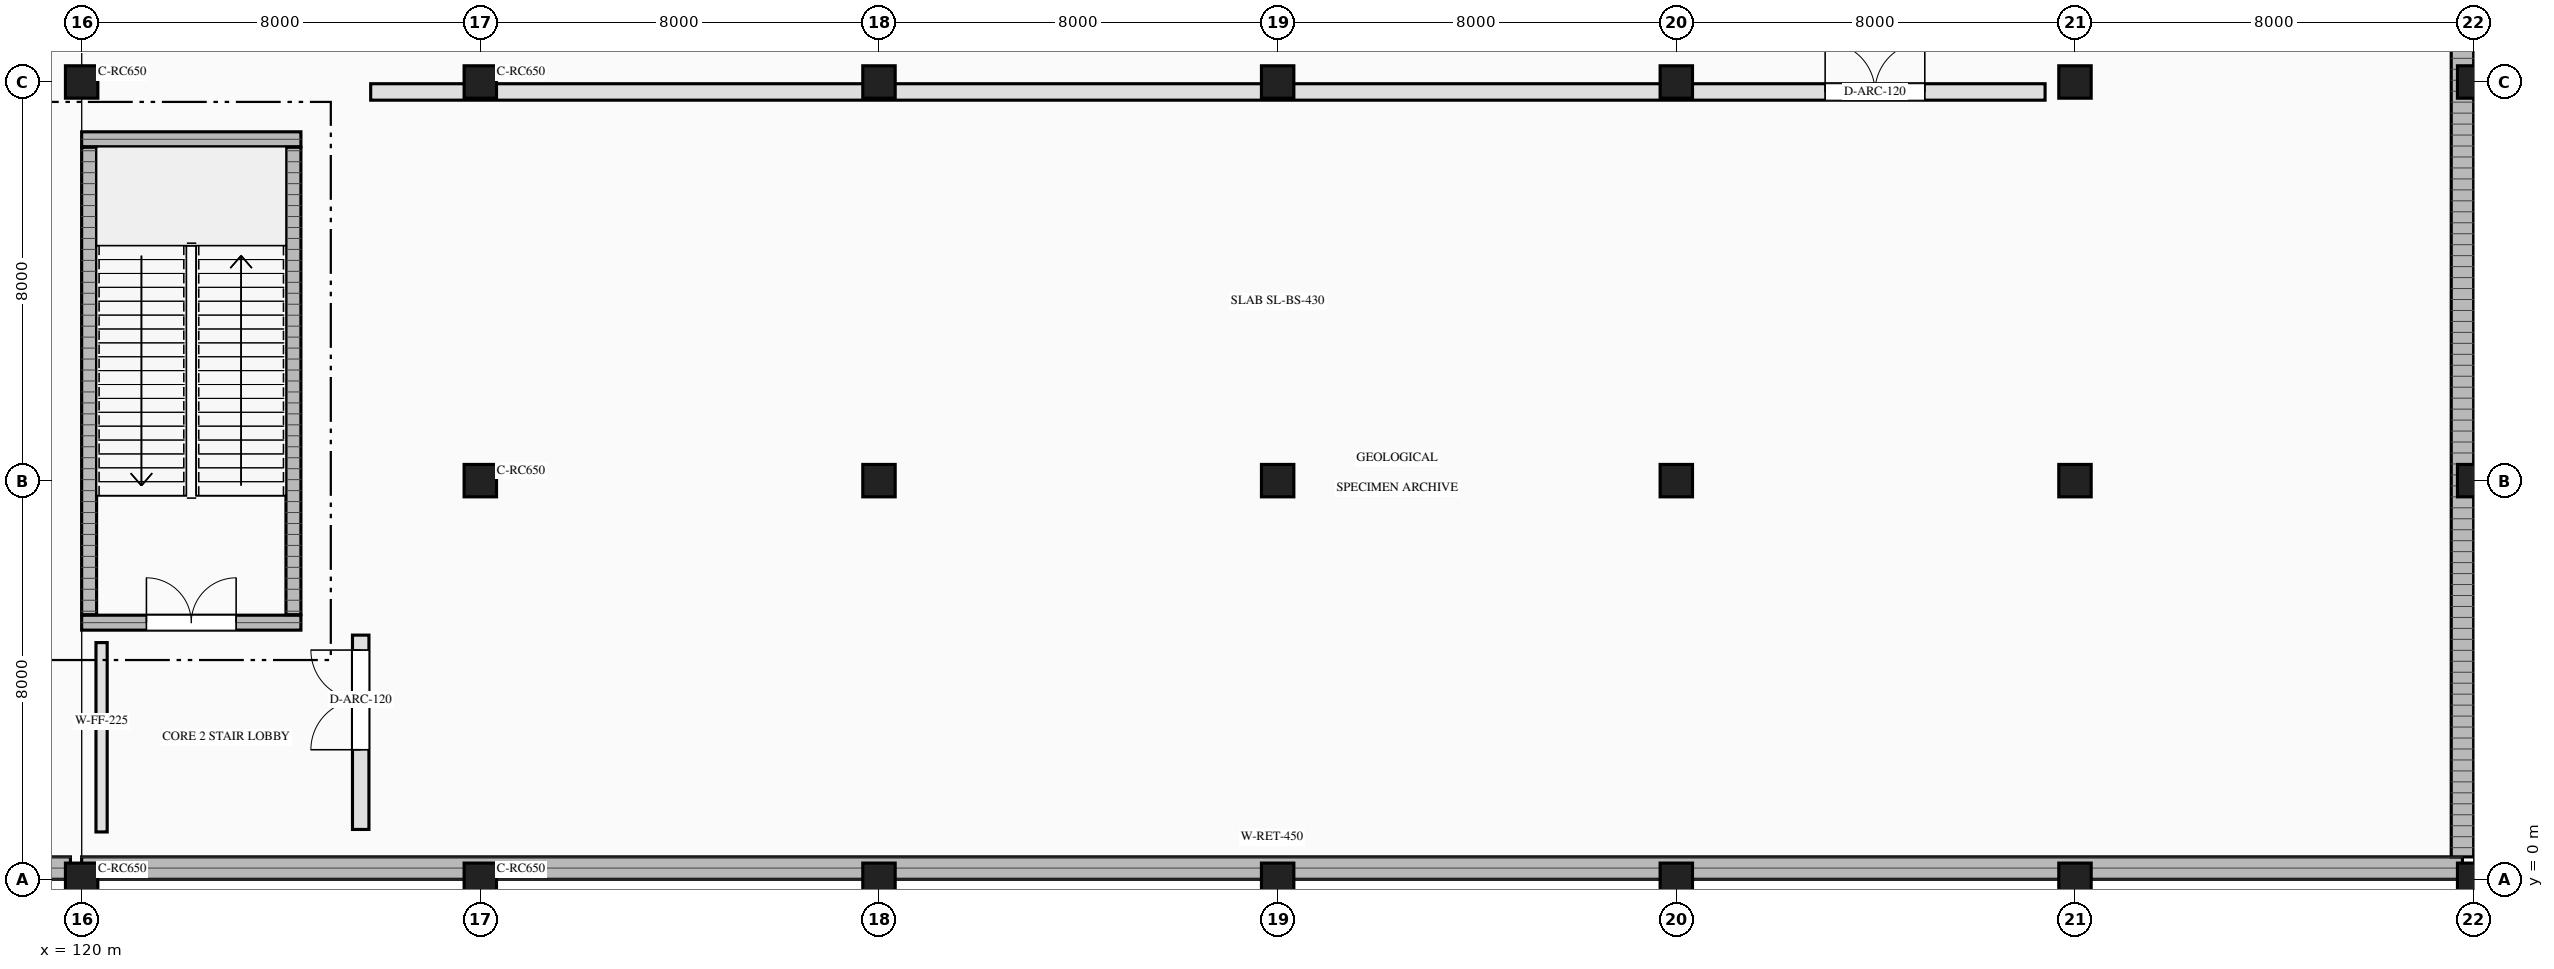
"""IFC4 building model, lengths in metres.
Left out: names, types, materials, properties, quantities, classifications, styles, units other than length and angle.
Written with IfcOpenShell. Run it as: python <this file> out.ifc"""

import sys

from ifc_helpers import new_model, si_unit, direction, frame, frame_2d, origin, origin_2d, place, context, subcontext, project, spatial, rectangle, extrude, element, fill, save


model = new_model("IFC4")
c1 = context("Model", 3, precision=1e-05, world=origin(), true_north=direction((0.0, 1.0)))
c2 = subcontext(c1, "Body", "Model", "MODEL_VIEW")
j1 = project(units=[si_unit("LENGTHUNIT", "METRE"), si_unit("PLANEANGLEUNIT", "RADIAN")], contexts=[c1])
p1 = place(None, origin())
s1 = spatial("IfcSite", under=j1, at=p1, CompositionType="ELEMENT")
p2 = place(p1, origin())
s2 = spatial("IfcBuilding", under=s1, at=p2, CompositionType="ELEMENT")
p3 = place(p2, frame((0.0, 0.0, -5.4)))
s3 = spatial("IfcBuildingStorey", under=s2, at=p3, CompositionType="ELEMENT", Elevation=-5.4)
p4 = place(p3, frame((120.0, 0.225, -0.4), z_axis=(0.0, 0.0, 1.0), x_axis=(1.0, 0.0, 0.0)))
e1 = element("IfcWall", 1, at=p4, inside=s3, PredefinedType="USERDEFINED", context=c2, shape_type="SweptSolid", body=[
    extrude(rectangle(XDim=47.775, YDim=0.45, at=frame_2d((23.887, 0.0))), origin(), (0.0, 0.0, 1.0), 5.5),
])
p5 = place(p3, frame((167.775, 0.45, -0.4), z_axis=(0.0, 0.0, 1.0), x_axis=(0.0, 1.0, 0.0)))
e2 = element("IfcWall", 2, at=p5, inside=s3, PredefinedType="USERDEFINED", context=c2, shape_type="SweptSolid", body=[
    extrude(rectangle(XDim=32.49, YDim=0.45, at=frame_2d((16.245, 0.0))), origin(), (0.0, 0.0, 1.0), 5.5),
])
p6 = place(p3, frame((80.225, 0.225, -0.4), z_axis=(0.0, 0.0, 1.0), x_axis=(1.0, 0.0, 0.0)))
e3 = element("IfcWall", 3, at=p6, inside=s3, PredefinedType="USERDEFINED", context=c2, shape_type="SweptSolid", body=[
    extrude(rectangle(XDim=39.55, YDim=0.45, at=frame_2d((19.775, 0.0))), origin(), (0.0, 0.0, 1.0), 5.5),
])
p7 = place(p3, frame((120.0, 5.15, -0.4), z_axis=(0.0, 0.0, 1.0), x_axis=(1.0, 0.0, 0.0)))
e4 = element("IfcWall", 4, at=p7, inside=s3, PredefinedType="SHEAR", context=c2, shape_type="SweptSolid", body=[
    extrude(rectangle(XDim=4.4, YDim=0.3, at=frame_2d((2.2, 0.0))), origin(), (0.0, 0.0, 1.0), 5.8),
])
p8 = place(p7, frame((1.3, 0.0, 0.4)))
e5 = element("IfcOpeningElement", 5, at=p8, cuts=e4, PredefinedType="OPENING", context=c2, shape_type="SweptSolid", body=[
    extrude(rectangle(XDim=1.8, YDim=2.2, at=frame_2d((0.9, 1.1))), frame((0.0, 0.16, 0.0), z_axis=(0.0, -1.0, 0.0), x_axis=(1.0, 0.0, 0.0)), (0.0, 0.0, 1.0), 0.32),
])
p9 = place(p3, frame((120.0, 14.85, -0.4), z_axis=(0.0, 0.0, 1.0), x_axis=(1.0, 0.0, 0.0)))
e6 = element("IfcWall", 6, at=p9, inside=s3, PredefinedType="SHEAR", context=c2, shape_type="SweptSolid", body=[
    extrude(rectangle(XDim=4.4, YDim=0.3, at=frame_2d((2.2, 0.0))), origin(), (0.0, 0.0, 1.0), 5.8),
])
for number, where, z_axis, x_axis in (
    (7, (120.15, 5.31, -0.4), (0.0, 0.0, 1.0), (0.0, 1.0, 0.0)),
    (8, (124.25, 5.31, -0.4), (0.0, 0.0, 1.0), (0.0, 1.0, 0.0)),
):
    element("IfcWall", number, at=place(p3, frame(where, z_axis=z_axis, x_axis=x_axis)), inside=s3, PredefinedType="SHEAR", context=c2, shape_type="SweptSolid", body=[
        extrude(rectangle(XDim=9.38, YDim=0.3, at=frame_2d((4.69, 0.0))), origin(), (0.0, 0.0, 1.0), 5.8),
    ])
for number, where, z_axis, x_axis in (
    (9, (120.0, 0.0, -0.4), (0.0, 0.0, 1.0), (1.0, 0.0, 0.0)),
    (10, (120.0, 16.0, -0.4), (0.0, 0.0, 1.0), (1.0, 0.0, 0.0)),
    (11, (128.0, 0.0, -0.4), (0.0, 0.0, 1.0), (1.0, 0.0, 0.0)),
    (12, (128.0, 8.0, -0.4), (0.0, 0.0, 1.0), (1.0, 0.0, 0.0)),
    (13, (128.0, 16.0, -0.4), (0.0, 0.0, 1.0), (1.0, 0.0, 0.0)),
    (14, (136.0, 0.0, -0.4), (0.0, 0.0, 1.0), (1.0, 0.0, 0.0)),
    (15, (136.0, 8.0, -0.4), (0.0, 0.0, 1.0), (1.0, 0.0, 0.0)),
    (16, (136.0, 16.0, -0.4), (0.0, 0.0, 1.0), (1.0, 0.0, 0.0)),
    (17, (144.0, 0.0, -0.4), (0.0, 0.0, 1.0), (1.0, 0.0, 0.0)),
    (18, (144.0, 8.0, -0.4), (0.0, 0.0, 1.0), (1.0, 0.0, 0.0)),
    (19, (144.0, 16.0, -0.4), (0.0, 0.0, 1.0), (1.0, 0.0, 0.0)),
    (20, (152.0, 0.0, -0.4), (0.0, 0.0, 1.0), (1.0, 0.0, 0.0)),
    (21, (152.0, 8.0, -0.4), (0.0, 0.0, 1.0), (1.0, 0.0, 0.0)),
    (22, (152.0, 16.0, -0.4), (0.0, 0.0, 1.0), (1.0, 0.0, 0.0)),
    (23, (160.0, 0.0, -0.4), (0.0, 0.0, 1.0), (1.0, 0.0, 0.0)),
    (24, (160.0, 8.0, -0.4), (0.0, 0.0, 1.0), (1.0, 0.0, 0.0)),
    (25, (160.0, 16.0, -0.4), (0.0, 0.0, 1.0), (1.0, 0.0, 0.0)),
    (26, (168.0, 0.0, -0.4), (0.0, 0.0, 1.0), (1.0, 0.0, 0.0)),
    (27, (168.0, 8.0, -0.4), (0.0, 0.0, 1.0), (1.0, 0.0, 0.0)),
    (28, (168.0, 16.0, -0.4), (0.0, 0.0, 1.0), (1.0, 0.0, 0.0)),
):
    element("IfcColumn", number, at=place(p3, frame(where, z_axis=z_axis, x_axis=x_axis)), inside=s3, PredefinedType="COLUMN", context=c2, shape_type="SweptSolid", body=[
        extrude(rectangle(XDim=0.65, YDim=0.65, at=origin_2d()), origin(), (0.0, 0.0, 1.0), 5.8),
    ])
p10 = place(p3, frame((125.6, 1.0, 0.0), z_axis=(0.0, 0.0, 1.0), x_axis=(0.0, 1.0, 0.0)))
e29 = element("IfcWall", 29, at=p10, inside=s3, PredefinedType="SOLIDWALL", context=c2, shape_type="SweptSolid", body=[
    extrude(rectangle(XDim=3.9, YDim=0.33, at=frame_2d((1.95, 0.0))), origin(), (0.0, 0.0, 1.0), 5.12),
])
p11 = place(p10, frame((1.6, 0.0, 0.0)))
e30 = element("IfcOpeningElement", 30, at=p11, cuts=e29, PredefinedType="OPENING", context=c2, shape_type="SweptSolid", body=[
    extrude(rectangle(XDim=2.0, YDim=2.5, at=frame_2d((1.0, 1.25))), frame((0.0, 0.175, 0.0), z_axis=(0.0, -1.0, 0.0), x_axis=(1.0, 0.0, 0.0)), (0.0, 0.0, 1.0), 0.35),
])
p12 = place(p3, frame((125.8, 15.8, 0.0), z_axis=(0.0, 0.0, 1.0), x_axis=(1.0, 0.0, 0.0)))
e31 = element("IfcWall", 31, at=p12, inside=s3, PredefinedType="SOLIDWALL", context=c2, shape_type="SweptSolid", body=[
    extrude(rectangle(XDim=33.6, YDim=0.33, at=frame_2d((16.8, 0.0))), origin(), (0.0, 0.0, 1.0), 4.72),
])
p13 = place(p12, frame((29.186, 0.0, 0.0)))
e32 = element("IfcOpeningElement", 32, at=p13, cuts=e31, PredefinedType="OPENING", context=c2, shape_type="SweptSolid", body=[
    extrude(rectangle(XDim=2.0, YDim=2.5, at=frame_2d((1.0, 1.25))), frame((0.0, 0.175, 0.0), z_axis=(0.0, -1.0, 0.0), x_axis=(1.0, 0.0, 0.0)), (0.0, 0.0, 1.0), 0.35),
])
p14 = place(p3, frame((120.4, 0.95, 0.0), z_axis=(0.0, 0.0, 1.0), x_axis=(0.0, 1.0, 0.0)))
e33 = element("IfcWall", 33, at=p14, inside=s3, PredefinedType="SOLIDWALL", context=c2, shape_type="SweptSolid", body=[
    extrude(rectangle(XDim=3.8, YDim=0.225, at=frame_2d((1.9, 0.0))), origin(), (0.0, 0.0, 1.0), 5.12),
])
p15 = place(p8, origin())
e34 = element("IfcDoor", 34, at=p15, inside=s3, OperationType="DOUBLE_DOOR_SINGLE_SWING", PredefinedType="DOOR", context=c2, shape_type="SweptSolid", body=[
    extrude(rectangle(XDim=1.8, YDim=2.2, at=frame_2d((0.9, 1.1))), frame((0.0, 0.025, 0.0), z_axis=(0.0, -1.0, 0.0), x_axis=(1.0, 0.0, 0.0)), (0.0, 0.0, 1.0), 0.05),
])
fill(e5, e34)
p16 = place(p11, origin())
e35 = element("IfcDoor", 35, at=p16, inside=s3, OperationType="DOUBLE_DOOR_SINGLE_SWING", PredefinedType="DOOR", context=c2, shape_type="SweptSolid", body=[
    extrude(rectangle(XDim=2.0, YDim=2.5, at=frame_2d((1.0, 1.25))), frame((0.0, 0.025, 0.0), z_axis=(0.0, -1.0, 0.0), x_axis=(1.0, 0.0, 0.0)), (0.0, 0.0, 1.0), 0.05),
])
fill(e30, e35)
p17 = place(p13, origin())
e36 = element("IfcDoor", 36, at=p17, inside=s3, OperationType="DOUBLE_DOOR_SINGLE_SWING", PredefinedType="DOOR", context=c2, shape_type="SweptSolid", body=[
    extrude(rectangle(XDim=2.0, YDim=2.5, at=frame_2d((1.0, 1.25))), frame((0.0, 0.025, 0.0), z_axis=(0.0, -1.0, 0.0), x_axis=(1.0, 0.0, 0.0)), (0.0, 0.0, 1.0), 0.05),
])
fill(e32, e36)
save(model, sys.argv[1])
